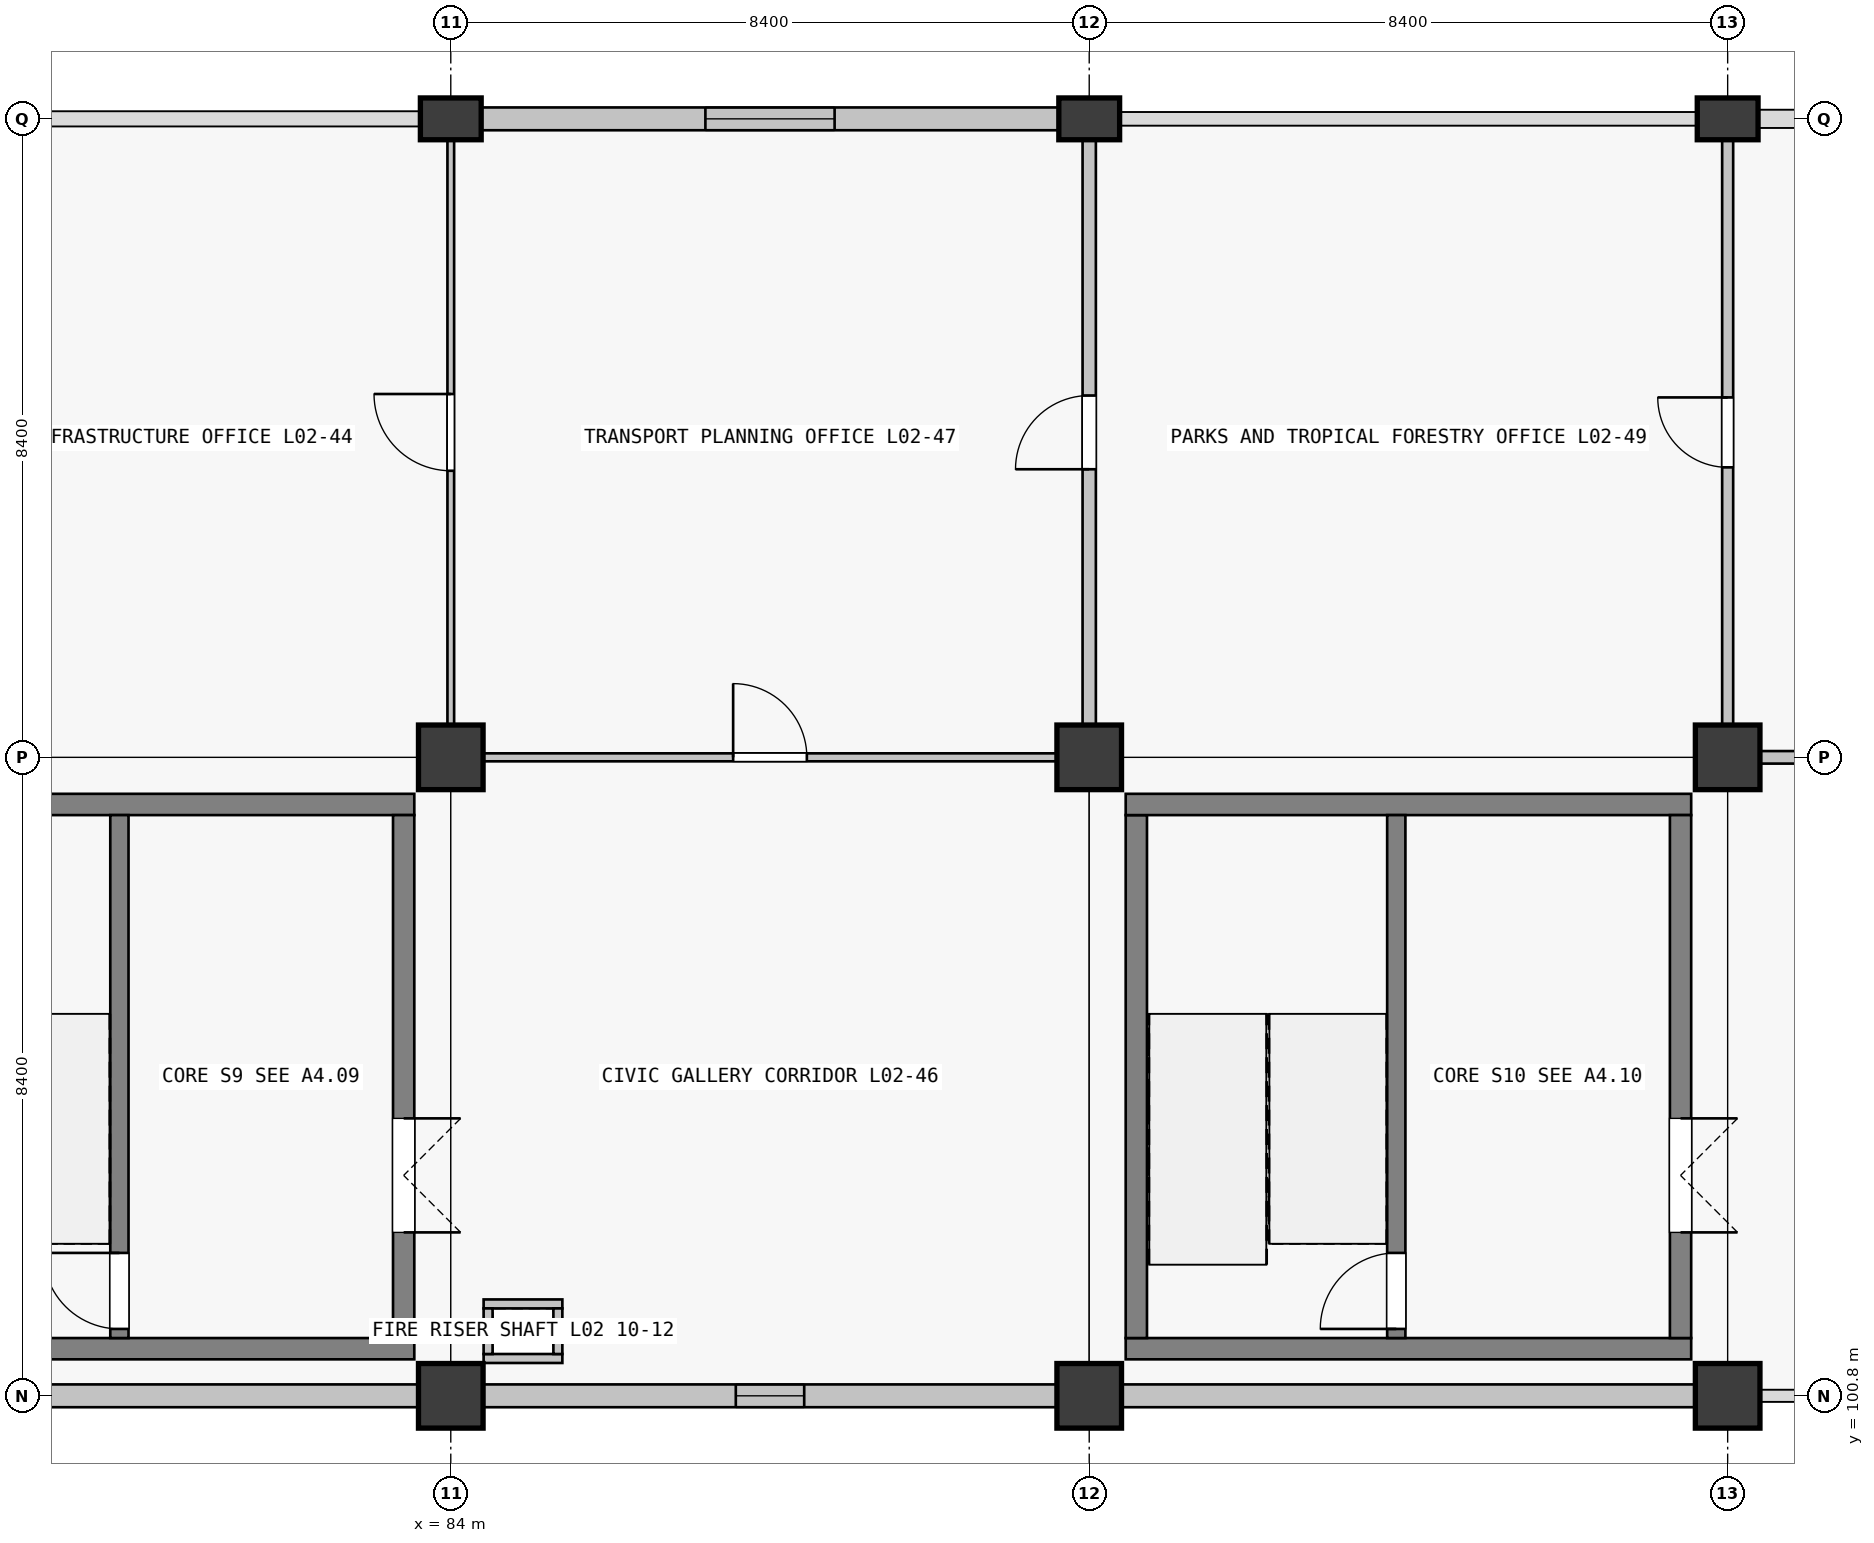
"""IFC4 building model, lengths in metres.
Left out: names, types, materials, properties, quantities, classifications, styles, units other than length and angle.
Written with IfcOpenShell. Run it as: python <this file> out.ifc"""

import sys

from ifc_helpers import new_model, si_unit, direction, frame, frame_2d, origin, origin_2d, place, context, subcontext, project, spatial, rectangle, extrude, element, fill, save


model = new_model("IFC4")
c1 = context("Model", 3, precision=1e-05, world=origin(), true_north=direction((0.0, 1.0)))
c2 = subcontext(c1, "Body", "Model", "MODEL_VIEW")
j1 = project(units=[si_unit("LENGTHUNIT", "METRE"), si_unit("PLANEANGLEUNIT", "RADIAN")], contexts=[c1])
p1 = place(None, origin())
s1 = spatial("IfcSite", under=j1, at=p1, CompositionType="ELEMENT")
p2 = place(p1, origin())
s2 = spatial("IfcBuilding", under=s1, at=p2, CompositionType="ELEMENT")
p3 = place(p2, frame((0.0, 0.0, 10.26)))
s3 = spatial("IfcBuildingStorey", under=s2, at=p3, CompositionType="ELEMENT", Elevation=10.26)
for number, where, z_axis, x_axis in (
    (1, (84.0, 100.8, 0.0), (0.0, 0.0, 1.0), (1.0, 0.0, 0.0)),
    (2, (84.0, 109.2, 0.0), (0.0, 0.0, 1.0), (1.0, 0.0, 0.0)),
):
    element("IfcColumn", number, at=place(p3, frame(where, z_axis=z_axis, x_axis=x_axis)), inside=s3, PredefinedType="COLUMN", context=c2, shape_type="SweptSolid", body=[
        extrude(rectangle(XDim=0.85, YDim=0.85, at=origin_2d()), origin(), (0.0, 0.0, 1.0), 4.5),
    ])
p4 = place(p3, frame((84.0, 117.6, 0.0), z_axis=(0.0, 0.0, 1.0), x_axis=(1.0, 0.0, 0.0)))
e3 = element("IfcColumn", 3, at=p4, inside=s3, PredefinedType="COLUMN", context=c2, shape_type="SweptSolid", body=[
    extrude(rectangle(XDim=0.8, YDim=0.55, at=origin_2d()), origin(), (0.0, 0.0, 1.0), 4.5),
])
for number, where, z_axis, x_axis in (
    (4, (92.4, 100.8, 0.0), (0.0, 0.0, 1.0), (1.0, 0.0, 0.0)),
    (5, (92.4, 109.2, 0.0), (0.0, 0.0, 1.0), (1.0, 0.0, 0.0)),
):
    element("IfcColumn", number, at=place(p3, frame(where, z_axis=z_axis, x_axis=x_axis)), inside=s3, PredefinedType="COLUMN", context=c2, shape_type="SweptSolid", body=[
        extrude(rectangle(XDim=0.85, YDim=0.85, at=origin_2d()), origin(), (0.0, 0.0, 1.0), 4.5),
    ])
p5 = place(p3, frame((92.4, 117.6, 0.0), z_axis=(0.0, 0.0, 1.0), x_axis=(1.0, 0.0, 0.0)))
e6 = element("IfcColumn", 6, at=p5, inside=s3, PredefinedType="COLUMN", context=c2, shape_type="SweptSolid", body=[
    extrude(rectangle(XDim=0.8, YDim=0.55, at=origin_2d()), origin(), (0.0, 0.0, 1.0), 4.5),
])
for number, where, z_axis, x_axis in (
    (7, (100.8, 100.8, 0.0), (0.0, 0.0, 1.0), (1.0, 0.0, 0.0)),
    (8, (100.8, 109.2, 0.0), (0.0, 0.0, 1.0), (1.0, 0.0, 0.0)),
):
    element("IfcColumn", number, at=place(p3, frame(where, z_axis=z_axis, x_axis=x_axis)), inside=s3, PredefinedType="COLUMN", context=c2, shape_type="SweptSolid", body=[
        extrude(rectangle(XDim=0.85, YDim=0.85, at=origin_2d()), origin(), (0.0, 0.0, 1.0), 4.5),
    ])
p6 = place(p3, frame((100.8, 117.6, 0.0), z_axis=(0.0, 0.0, 1.0), x_axis=(1.0, 0.0, 0.0)))
e9 = element("IfcColumn", 9, at=p6, inside=s3, PredefinedType="COLUMN", context=c2, shape_type="SweptSolid", body=[
    extrude(rectangle(XDim=0.8, YDim=0.55, at=origin_2d()), origin(), (0.0, 0.0, 1.0), 4.5),
])
p7 = place(p3, frame((83.574, 100.8, 0.0), z_axis=(0.0, 0.0, 1.0), x_axis=(-1.0, 0.0, 0.0)))
e10 = element("IfcWall", 10, at=p7, inside=s3, PredefinedType="SOLIDWALL", context=c2, shape_type="SweptSolid", body=[
    extrude(rectangle(XDim=7.548, YDim=0.3, at=frame_2d((3.774, 0.0))), origin(), (0.0, 0.0, 1.0), 3.54),
])
p8 = place(p3, frame((91.974, 100.8, 0.0), z_axis=(0.0, 0.0, 1.0), x_axis=(-1.0, 0.0, 0.0)))
e11 = element("IfcWall", 11, at=p8, inside=s3, PredefinedType="SOLIDWALL", context=c2, shape_type="SweptSolid", body=[
    extrude(rectangle(XDim=7.548, YDim=0.3, at=frame_2d((3.774, 0.0))), origin(), (0.0, 0.0, 1.0), 3.54),
])
p9 = place(p8, frame((3.324, 0.0, 0.9)))
e12 = element("IfcOpeningElement", 12, at=p9, cuts=e11, PredefinedType="OPENING", context=c2, shape_type="SweptSolid", body=[
    extrude(rectangle(XDim=0.9, YDim=1.5, at=frame_2d((0.45, 0.75))), frame((0.0, 0.15, 0.0), z_axis=(0.0, -1.0, 0.0), x_axis=(1.0, 0.0, 0.0)), (0.0, 0.0, 1.0), 0.3),
])
p10 = place(p3, frame((84.401, 117.6, 0.0), z_axis=(0.0, 0.0, 1.0), x_axis=(1.0, 0.0, 0.0)))
e13 = element("IfcWall", 13, at=p10, inside=s3, PredefinedType="SOLIDWALL", context=c2, shape_type="SweptSolid", body=[
    extrude(rectangle(XDim=7.598, YDim=0.3, at=frame_2d((3.799, 0.0))), origin(), (0.0, 0.0, 1.0), 3.54),
])
p11 = place(p10, frame((2.949, 0.0, 0.9)))
e14 = element("IfcOpeningElement", 14, at=p11, cuts=e13, PredefinedType="OPENING", context=c2, shape_type="SweptSolid", body=[
    extrude(rectangle(XDim=1.7, YDim=1.85, at=frame_2d((0.85, 0.925))), frame((0.0, 0.15, 0.0), z_axis=(0.0, -1.0, 0.0), x_axis=(1.0, 0.0, 0.0)), (0.0, 0.0, 1.0), 0.3),
])
p12 = place(p3, frame((100.374, 100.8, 0.0), z_axis=(0.0, 0.0, 1.0), x_axis=(-1.0, 0.0, 0.0)))
e15 = element("IfcWall", 15, at=p12, inside=s3, PredefinedType="SOLIDWALL", context=c2, shape_type="SweptSolid", body=[
    extrude(rectangle(XDim=7.548, YDim=0.3, at=frame_2d((3.774, 0.0))), origin(), (0.0, 0.0, 1.0), 3.54),
])
for number, where, z_axis, x_axis in (
    (16, (83.52, 101.42, 0.0), (0.0, 0.0, 1.0), (-1.0, 0.0, 0.0)),
    (17, (76.08, 108.58, 0.0), (0.0, 0.0, 1.0), (1.0, 0.0, 0.0)),
):
    element("IfcWall", number, at=place(p3, frame(where, z_axis=z_axis, x_axis=x_axis)), inside=s3, PredefinedType="SHEAR", context=c2, shape_type="SweptSolid", body=[
        extrude(rectangle(XDim=7.44, YDim=0.28, at=frame_2d((3.72, 0.0))), origin(), (0.0, 0.0, 1.0), 4.5),
    ])
p13 = place(p3, frame((83.38, 108.44, 0.0), z_axis=(0.0, 0.0, 1.0), x_axis=(0.0, -1.0, 0.0)))
e18 = element("IfcWall", 18, at=p13, inside=s3, PredefinedType="SHEAR", context=c2, shape_type="SweptSolid", body=[
    extrude(rectangle(XDim=6.88, YDim=0.28, at=frame_2d((3.44, 0.0))), origin(), (0.0, 0.0, 1.0), 4.5),
])
p14 = place(p13, frame((3.99, 0.0, 0.0)))
e19 = element("IfcOpeningElement", 19, at=p14, cuts=e18, PredefinedType="OPENING", context=c2, shape_type="SweptSolid", body=[
    extrude(rectangle(XDim=1.5, YDim=2.15, at=frame_2d((0.75, 1.075))), frame((0.0, 0.14, 0.0), z_axis=(0.0, -1.0, 0.0), x_axis=(1.0, 0.0, 0.0)), (0.0, 0.0, 1.0), 0.28),
])
p15 = place(p3, frame((79.64, 101.56, 0.0), z_axis=(0.0, 0.0, 1.0), x_axis=(0.0, 1.0, 0.0)))
e20 = element("IfcWall", 20, at=p15, inside=s3, PredefinedType="SHEAR", context=c2, shape_type="SweptSolid", body=[
    extrude(rectangle(XDim=6.88, YDim=0.24, at=frame_2d((3.44, 0.0))), origin(), (0.0, 0.0, 1.0), 4.5),
])
p16 = place(p15, frame((0.12, 0.0, 0.0)))
e21 = element("IfcOpeningElement", 21, at=p16, cuts=e20, PredefinedType="OPENING", context=c2, shape_type="SweptSolid", body=[
    extrude(rectangle(XDim=1.0, YDim=2.15, at=frame_2d((0.5, 1.075))), frame((0.0, 0.12, 0.0), z_axis=(0.0, -1.0, 0.0), x_axis=(1.0, 0.0, 0.0)), (0.0, 0.0, 1.0), 0.24),
])
p17 = place(p3, frame((100.32, 101.42, 0.0), z_axis=(0.0, 0.0, 1.0), x_axis=(-1.0, 0.0, 0.0)))
e22 = element("IfcWall", 22, at=p17, inside=s3, PredefinedType="SHEAR", context=c2, shape_type="SweptSolid", body=[
    extrude(rectangle(XDim=7.44, YDim=0.28, at=frame_2d((3.72, 0.0))), origin(), (0.0, 0.0, 1.0), 4.5),
])
p18 = place(p3, frame((93.02, 101.56, 0.0), z_axis=(0.0, 0.0, 1.0), x_axis=(0.0, 1.0, 0.0)))
e23 = element("IfcWall", 23, at=p18, inside=s3, PredefinedType="SHEAR", context=c2, shape_type="SweptSolid", body=[
    extrude(rectangle(XDim=6.88, YDim=0.28, at=frame_2d((3.44, 0.0))), origin(), (0.0, 0.0, 1.0), 4.5),
])
p19 = place(p3, frame((92.88, 108.58, 0.0), z_axis=(0.0, 0.0, 1.0), x_axis=(1.0, 0.0, 0.0)))
e24 = element("IfcWall", 24, at=p19, inside=s3, PredefinedType="SHEAR", context=c2, shape_type="SweptSolid", body=[
    extrude(rectangle(XDim=7.44, YDim=0.28, at=frame_2d((3.72, 0.0))), origin(), (0.0, 0.0, 1.0), 4.5),
])
p20 = place(p3, frame((100.18, 108.44, 0.0), z_axis=(0.0, 0.0, 1.0), x_axis=(0.0, -1.0, 0.0)))
e25 = element("IfcWall", 25, at=p20, inside=s3, PredefinedType="SHEAR", context=c2, shape_type="SweptSolid", body=[
    extrude(rectangle(XDim=6.88, YDim=0.28, at=frame_2d((3.44, 0.0))), origin(), (0.0, 0.0, 1.0), 4.5),
])
p21 = place(p20, frame((3.99, 0.0, 0.0)))
e26 = element("IfcOpeningElement", 26, at=p21, cuts=e25, PredefinedType="OPENING", context=c2, shape_type="SweptSolid", body=[
    extrude(rectangle(XDim=1.5, YDim=2.15, at=frame_2d((0.75, 1.075))), frame((0.0, 0.14, 0.0), z_axis=(0.0, -1.0, 0.0), x_axis=(1.0, 0.0, 0.0)), (0.0, 0.0, 1.0), 0.28),
])
p22 = place(p3, frame((96.44, 101.56, 0.0), z_axis=(0.0, 0.0, 1.0), x_axis=(0.0, 1.0, 0.0)))
e27 = element("IfcWall", 27, at=p22, inside=s3, PredefinedType="SHEAR", context=c2, shape_type="SweptSolid", body=[
    extrude(rectangle(XDim=6.88, YDim=0.24, at=frame_2d((3.44, 0.0))), origin(), (0.0, 0.0, 1.0), 4.5),
])
p23 = place(p22, frame((0.12, 0.0, 0.0)))
e28 = element("IfcOpeningElement", 28, at=p23, cuts=e27, PredefinedType="OPENING", context=c2, shape_type="SweptSolid", body=[
    extrude(rectangle(XDim=1.0, YDim=2.15, at=frame_2d((0.5, 1.075))), frame((0.0, 0.12, 0.0), z_axis=(0.0, -1.0, 0.0), x_axis=(1.0, 0.0, 0.0)), (0.0, 0.0, 1.0), 0.24),
])
for number, where, z_axis, x_axis in (
    (29, (84.432, 101.291, 0.0), (0.0, 0.0, 1.0), (1.0, 0.0, 0.0)),
    (30, (84.432, 102.009, 0.0), (0.0, 0.0, 1.0), (1.0, 0.0, 0.0)),
):
    element("IfcWall", number, at=place(p3, frame(where, z_axis=z_axis, x_axis=x_axis)), inside=s3, PredefinedType="PARTITIONING", context=c2, shape_type="SweptSolid", body=[
        extrude(rectangle(XDim=1.036, YDim=0.118, at=frame_2d((0.518, 0.0))), origin(), (0.0, 0.0, 1.0), 3.53),
    ])
for number, where, z_axis, x_axis in (
    (31, (84.491, 101.35, 0.0), (0.0, 0.0, 1.0), (0.0, 1.0, 0.0)),
    (32, (85.409, 101.35, 0.0), (0.0, 0.0, 1.0), (0.0, 1.0, 0.0)),
):
    element("IfcWall", number, at=place(p3, frame(where, z_axis=z_axis, x_axis=x_axis)), inside=s3, PredefinedType="PARTITIONING", context=c2, shape_type="SweptSolid", body=[
        extrude(rectangle(XDim=0.6, YDim=0.118, at=frame_2d((0.3, 0.0))), origin(), (0.0, 0.0, 1.0), 3.53),
    ])
p24 = place(p3, frame((84.427, 109.2, 0.0), z_axis=(0.0, 0.0, 1.0), x_axis=(1.0, 0.0, 0.0)))
e33 = element("IfcWall", 33, at=p24, inside=s3, PredefinedType="PARTITIONING", context=c2, shape_type="SweptSolid", body=[
    extrude(rectangle(XDim=7.546, YDim=0.105, at=frame_2d((3.773, 0.0))), origin(), (0.0, 0.0, 1.0), 3.37),
])
p25 = place(p24, frame((3.288, 0.0, 0.0)))
e34 = element("IfcOpeningElement", 34, at=p25, cuts=e33, PredefinedType="OPENING", context=c2, shape_type="SweptSolid", body=[
    extrude(rectangle(XDim=0.97, YDim=2.12, at=frame_2d((0.485, 1.06))), frame((0.0, 0.052, 0.0), z_axis=(0.0, -1.0, 0.0), x_axis=(1.0, 0.0, 0.0)), (0.0, 0.0, 1.0), 0.105),
])
p26 = place(p3, frame((101.227, 109.2, 0.0), z_axis=(0.0, 0.0, 1.0), x_axis=(1.0, 0.0, 0.0)))
e35 = element("IfcWall", 35, at=p26, inside=s3, PredefinedType="PARTITIONING", context=c2, shape_type="SweptSolid", body=[
    extrude(rectangle(XDim=7.546, YDim=0.165, at=frame_2d((3.773, 0.0))), origin(), (0.0, 0.0, 1.0), 3.37),
])
p27 = place(p26, frame((3.273, 0.0, 0.0)))
e36 = element("IfcOpeningElement", 36, at=p27, cuts=e35, PredefinedType="OPENING", context=c2, shape_type="SweptSolid", body=[
    extrude(rectangle(XDim=1.0, YDim=2.2, at=frame_2d((0.5, 1.1))), frame((0.0, 0.083, 0.0), z_axis=(0.0, -1.0, 0.0), x_axis=(1.0, 0.0, 0.0)), (0.0, 0.0, 1.0), 0.165),
])
p28 = place(p3, frame((84.0, 109.627, 0.0), z_axis=(0.0, 0.0, 1.0), x_axis=(0.0, 1.0, 0.0)))
e37 = element("IfcWall", 37, at=p28, inside=s3, PredefinedType="PARTITIONING", context=c2, shape_type="SweptSolid", body=[
    extrude(rectangle(XDim=7.696, YDim=0.088, at=frame_2d((3.848, 0.0))), origin(), (0.0, 0.0, 1.0), 3.37),
])
p29 = place(p28, frame((3.343, 0.0, 0.0)))
e38 = element("IfcOpeningElement", 38, at=p29, cuts=e37, PredefinedType="OPENING", context=c2, shape_type="SweptSolid", body=[
    extrude(rectangle(XDim=1.01, YDim=2.12, at=frame_2d((0.505, 1.06))), frame((0.0, 0.044, 0.0), z_axis=(0.0, -1.0, 0.0), x_axis=(1.0, 0.0, 0.0)), (0.0, 0.0, 1.0), 0.088),
])
p30 = place(p3, frame((92.4, 109.627, 0.0), z_axis=(0.0, 0.0, 1.0), x_axis=(0.0, 1.0, 0.0)))
e39 = element("IfcWall", 39, at=p30, inside=s3, PredefinedType="PARTITIONING", context=c2, shape_type="SweptSolid", body=[
    extrude(rectangle(XDim=7.696, YDim=0.175, at=frame_2d((3.848, 0.0))), origin(), (0.0, 0.0, 1.0), 3.37),
])
p31 = place(p30, frame((3.363, 0.0, 0.0)))
e40 = element("IfcOpeningElement", 40, at=p31, cuts=e39, PredefinedType="OPENING", context=c2, shape_type="SweptSolid", body=[
    extrude(rectangle(XDim=0.97, YDim=2.12, at=frame_2d((0.485, 1.06))), frame((0.0, 0.087, 0.0), z_axis=(0.0, -1.0, 0.0), x_axis=(1.0, 0.0, 0.0)), (0.0, 0.0, 1.0), 0.175),
])
p32 = place(p3, frame((100.8, 109.627, 0.0), z_axis=(0.0, 0.0, 1.0), x_axis=(0.0, 1.0, 0.0)))
e41 = element("IfcWall", 41, at=p32, inside=s3, PredefinedType="PARTITIONING", context=c2, shape_type="SweptSolid", body=[
    extrude(rectangle(XDim=7.696, YDim=0.145, at=frame_2d((3.848, 0.0))), origin(), (0.0, 0.0, 1.0), 3.37),
])
p33 = place(p32, frame((3.388, 0.0, 0.0)))
e42 = element("IfcOpeningElement", 42, at=p33, cuts=e41, PredefinedType="OPENING", context=c2, shape_type="SweptSolid", body=[
    extrude(rectangle(XDim=0.92, YDim=2.15, at=frame_2d((0.46, 1.075))), frame((0.0, 0.073, 0.0), z_axis=(0.0, -1.0, 0.0), x_axis=(1.0, 0.0, 0.0)), (0.0, 0.0, 1.0), 0.145),
])
p34 = place(p9, origin())
e43 = element("IfcWindow", 43, at=p34, inside=s3, PartitioningType="SINGLE_PANEL", PredefinedType="WINDOW", context=c2, shape_type="SweptSolid", body=[
    extrude(rectangle(XDim=0.9, YDim=1.5, at=frame_2d((0.45, 0.75))), frame((0.0, 0.03, 0.0), z_axis=(0.0, -1.0, 0.0), x_axis=(1.0, 0.0, 0.0)), (0.0, 0.0, 1.0), 0.06),
])
fill(e12, e43)
p35 = place(p11, origin())
e44 = element("IfcWindow", 44, at=p35, inside=s3, PartitioningType="SINGLE_PANEL", PredefinedType="WINDOW", context=c2, shape_type="SweptSolid", body=[
    extrude(rectangle(XDim=1.7, YDim=1.85, at=frame_2d((0.85, 0.925))), frame((0.0, 0.03, 0.0), z_axis=(0.0, -1.0, 0.0), x_axis=(1.0, 0.0, 0.0)), (0.0, 0.0, 1.0), 0.06),
])
fill(e14, e44)
p36 = place(p16, origin())
e45 = element("IfcDoor", 45, at=p36, inside=s3, OperationType="SINGLE_SWING_RIGHT", PredefinedType="DOOR", context=c2, shape_type="SweptSolid", body=[
    extrude(rectangle(XDim=1.0, YDim=2.15, at=frame_2d((0.5, 1.075))), frame((0.0, 0.025, 0.0), z_axis=(0.0, -1.0, 0.0), x_axis=(1.0, 0.0, 0.0)), (0.0, 0.0, 1.0), 0.05),
])
fill(e21, e45)
p37 = place(p14, origin())
e46 = element("IfcDoor", 46, at=p37, inside=s3, OperationType="DOUBLE_DOOR_SINGLE_SWING", PredefinedType="DOOR", context=c2, shape_type="SweptSolid", body=[
    extrude(rectangle(XDim=1.5, YDim=2.15, at=frame_2d((0.75, 1.075))), frame((0.0, 0.025, 0.0), z_axis=(0.0, -1.0, 0.0), x_axis=(1.0, 0.0, 0.0)), (0.0, 0.0, 1.0), 0.05),
])
fill(e19, e46)
p38 = place(p23, origin())
e47 = element("IfcDoor", 47, at=p38, inside=s3, OperationType="SINGLE_SWING_LEFT", PredefinedType="DOOR", context=c2, shape_type="SweptSolid", body=[
    extrude(rectangle(XDim=1.0, YDim=2.15, at=frame_2d((0.5, 1.075))), frame((0.0, 0.025, 0.0), z_axis=(0.0, -1.0, 0.0), x_axis=(1.0, 0.0, 0.0)), (0.0, 0.0, 1.0), 0.05),
])
fill(e28, e47)
p39 = place(p21, origin())
e48 = element("IfcDoor", 48, at=p39, inside=s3, OperationType="DOUBLE_DOOR_SINGLE_SWING", PredefinedType="DOOR", context=c2, shape_type="SweptSolid", body=[
    extrude(rectangle(XDim=1.5, YDim=2.15, at=frame_2d((0.75, 1.075))), frame((0.0, 0.025, 0.0), z_axis=(0.0, -1.0, 0.0), x_axis=(1.0, 0.0, 0.0)), (0.0, 0.0, 1.0), 0.05),
])
fill(e26, e48)
p40 = place(p25, origin())
e49 = element("IfcDoor", 49, at=p40, inside=s3, OperationType="SINGLE_SWING_LEFT", PredefinedType="DOOR", context=c2, shape_type="SweptSolid", body=[
    extrude(rectangle(XDim=0.97, YDim=2.12, at=frame_2d((0.485, 1.06))), frame((0.0, 0.025, 0.0), z_axis=(0.0, -1.0, 0.0), x_axis=(1.0, 0.0, 0.0)), (0.0, 0.0, 1.0), 0.05),
])
fill(e34, e49)
p41 = place(p29, origin())
e50 = element("IfcDoor", 50, at=p41, inside=s3, OperationType="SINGLE_SWING_RIGHT", PredefinedType="DOOR", context=c2, shape_type="SweptSolid", body=[
    extrude(rectangle(XDim=1.01, YDim=2.12, at=frame_2d((0.505, 1.06))), frame((0.0, 0.025, 0.0), z_axis=(0.0, -1.0, 0.0), x_axis=(1.0, 0.0, 0.0)), (0.0, 0.0, 1.0), 0.05),
])
fill(e38, e50)
p42 = place(p31, origin())
e51 = element("IfcDoor", 51, at=p42, inside=s3, OperationType="SINGLE_SWING_LEFT", PredefinedType="DOOR", context=c2, shape_type="SweptSolid", body=[
    extrude(rectangle(XDim=0.97, YDim=2.12, at=frame_2d((0.485, 1.06))), frame((0.0, 0.025, 0.0), z_axis=(0.0, -1.0, 0.0), x_axis=(1.0, 0.0, 0.0)), (0.0, 0.0, 1.0), 0.05),
])
fill(e40, e51)
p43 = place(p33, origin())
e52 = element("IfcDoor", 52, at=p43, inside=s3, OperationType="SINGLE_SWING_RIGHT", PredefinedType="DOOR", context=c2, shape_type="SweptSolid", body=[
    extrude(rectangle(XDim=0.92, YDim=2.15, at=frame_2d((0.46, 1.075))), frame((0.0, 0.025, 0.0), z_axis=(0.0, -1.0, 0.0), x_axis=(1.0, 0.0, 0.0)), (0.0, 0.0, 1.0), 0.05),
])
fill(e42, e52)
save(model, sys.argv[1])
